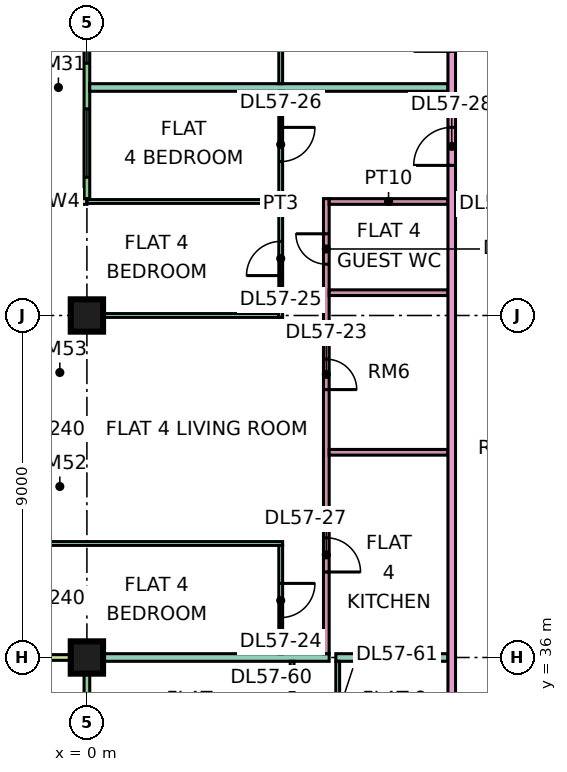
"""IFC4 building model, lengths in metres.
Left out: names, types, materials, properties, quantities, classifications, styles, units other than length and angle.
Written with IfcOpenShell. Run it as: python <this file> out.ifc"""

import sys

from ifc_helpers import new_model, si_unit, direction, frame, frame_2d, origin, origin_2d, place, context, subcontext, project, spatial, rectangle, extrude, element, fill, save


model = new_model("IFC4")
c1 = context("Model", 3, precision=1e-05, world=origin(), true_north=direction((0.0, 1.0)))
c2 = subcontext(c1, "Body", "Model", "MODEL_VIEW")
j1 = project(units=[si_unit("LENGTHUNIT", "METRE"), si_unit("PLANEANGLEUNIT", "RADIAN")], contexts=[c1])
p1 = place(None, origin())
s1 = spatial("IfcSite", under=j1, at=p1, CompositionType="ELEMENT")
p2 = place(p1, origin())
s2 = spatial("IfcBuilding", under=s1, at=p2, CompositionType="ELEMENT")
p3 = place(p2, frame((0.0, 0.0, 241.65)))
s3 = spatial("IfcBuildingStorey", under=s2, at=p3, CompositionType="ELEMENT", Elevation=241.65)
p4 = place(p3, frame((0.0, 36.0, 0.0), z_axis=(0.0, 0.0, 1.0), x_axis=(1.0, 0.0, 0.0)))
e1 = element("IfcColumn", 1, at=p4, inside=s3, PredefinedType="COLUMN", context=c2, shape_type="SweptSolid", body=[
    extrude(rectangle(XDim=0.85, YDim=0.85, at=origin_2d()), origin(), (0.0, 0.0, 1.0), 3.75),
])
p5 = place(p3, frame((0.0, 45.0, 0.0), z_axis=(0.0, 0.0, 1.0), x_axis=(1.0, 0.0, 0.0)))
e2 = element("IfcColumn", 2, at=p5, inside=s3, PredefinedType="COLUMN", context=c2, shape_type="SweptSolid", body=[
    extrude(rectangle(XDim=0.85, YDim=0.85, at=origin_2d()), origin(), (0.0, 0.0, 1.0), 3.75),
])
p6 = place(p3, frame((0.0, 61.425, 0.0), z_axis=(0.0, 0.0, 1.0), x_axis=(0.0, -1.0, 0.0)))
e3 = element("IfcWall", 3, at=p6, inside=s3, PredefinedType="SOLIDWALL", context=c2, shape_type="SweptSolid", body=[
    extrude(rectangle(XDim=13.35, YDim=0.15, at=frame_2d((6.675, 0.0))), origin(), (0.0, 0.0, 1.0), 3.35),
])
p7 = place(p6, frame((1.312, 0.0, 0.0)))
e4 = element("IfcOpeningElement", 4, at=p7, cuts=e3, PredefinedType="OPENING", context=c2, shape_type="SweptSolid", body=[
    extrude(rectangle(XDim=1.8, YDim=2.4, at=frame_2d((0.9, 1.2))), frame((0.0, 0.085, 0.0), z_axis=(0.0, -1.0, 0.0), x_axis=(1.0, 0.0, 0.0)), (0.0, 0.0, 1.0), 0.17),
])
p8 = place(p6, frame((5.062, 0.0, 0.45)))
e5 = element("IfcOpeningElement", 5, at=p8, cuts=e3, PredefinedType="OPENING", context=c2, shape_type="SweptSolid", body=[
    extrude(rectangle(XDim=1.2, YDim=2.4, at=frame_2d((0.6, 1.2))), frame((0.0, 0.085, 0.0), z_axis=(0.0, -1.0, 0.0), x_axis=(1.0, 0.0, 0.0)), (0.0, 0.0, 1.0), 0.17),
])
p9 = place(p6, frame((8.587, 0.0, 0.45)))
e6 = element("IfcOpeningElement", 6, at=p9, cuts=e3, PredefinedType="OPENING", context=c2, shape_type="SweptSolid", body=[
    extrude(rectangle(XDim=1.2, YDim=2.4, at=frame_2d((0.6, 1.2))), frame((0.0, 0.085, 0.0), z_axis=(0.0, -1.0, 0.0), x_axis=(1.0, 0.0, 0.0)), (0.0, 0.0, 1.0), 0.17),
])
p10 = place(p6, frame((10.988, 0.0, 0.45)))
e7 = element("IfcOpeningElement", 7, at=p10, cuts=e3, PredefinedType="OPENING", context=c2, shape_type="SweptSolid", body=[
    extrude(rectangle(XDim=1.8, YDim=2.4, at=frame_2d((0.9, 1.2))), frame((0.0, 0.085, 0.0), z_axis=(0.0, -1.0, 0.0), x_axis=(1.0, 0.0, 0.0)), (0.0, 0.0, 1.0), 0.17),
])
p11 = place(p3, frame((-1.5, 48.0, 0.0), z_axis=(0.0, 0.0, 1.0), x_axis=(1.0, 0.0, 0.0)))
e8 = element("IfcWall", 8, at=p11, inside=s3, PredefinedType="SOLIDWALL", context=c2, shape_type="SweptSolid", body=[
    extrude(rectangle(XDim=1.5, YDim=0.15, at=frame_2d((0.75, 0.0))), origin(), (0.0, 0.0, 1.0), 3.35),
])
p12 = place(p3, frame((0.0, 35.925, 0.0), z_axis=(0.0, 0.0, 1.0), x_axis=(0.0, -1.0, 0.0)))
e9 = element("IfcWall", 9, at=p12, inside=s3, PredefinedType="SOLIDWALL", context=c2, shape_type="SweptSolid", body=[
    extrude(rectangle(XDim=11.85, YDim=0.15, at=frame_2d((5.925, 0.0))), origin(), (0.0, 0.0, 1.0), 3.35),
])
p13 = place(p12, frame((1.087, 0.0, 0.0)))
e10 = element("IfcOpeningElement", 10, at=p13, cuts=e9, PredefinedType="OPENING", context=c2, shape_type="SweptSolid", body=[
    extrude(rectangle(XDim=1.2, YDim=2.4, at=frame_2d((0.6, 1.2))), frame((0.0, 0.085, 0.0), z_axis=(0.0, -1.0, 0.0), x_axis=(1.0, 0.0, 0.0)), (0.0, 0.0, 1.0), 0.17),
])
p14 = place(p12, frame((3.525, 0.0, 0.45)))
e11 = element("IfcOpeningElement", 11, at=p14, cuts=e9, PredefinedType="OPENING", context=c2, shape_type="SweptSolid", body=[
    extrude(rectangle(XDim=1.8, YDim=2.4, at=frame_2d((0.9, 1.2))), frame((0.0, 0.085, 0.0), z_axis=(0.0, -1.0, 0.0), x_axis=(1.0, 0.0, 0.0)), (0.0, 0.0, 1.0), 0.17),
])
p15 = place(p12, frame((7.163, 0.0, 0.45)))
e12 = element("IfcOpeningElement", 12, at=p15, cuts=e9, PredefinedType="OPENING", context=c2, shape_type="SweptSolid", body=[
    extrude(rectangle(XDim=3.0, YDim=2.4, at=frame_2d((1.5, 1.2))), frame((0.0, 0.085, 0.0), z_axis=(0.0, -1.0, 0.0), x_axis=(1.0, 0.0, 0.0)), (0.0, 0.0, 1.0), 0.17),
])
p16 = place(p3, frame((-1.5, 36.0, 0.0), z_axis=(0.0, 0.0, 1.0), x_axis=(1.0, 0.0, 0.0)))
e13 = element("IfcWall", 13, at=p16, inside=s3, PredefinedType="SOLIDWALL", context=c2, shape_type="SweptSolid", body=[
    extrude(rectangle(XDim=1.5, YDim=0.15, at=frame_2d((0.75, 0.0))), origin(), (0.0, 0.0, 1.0), 3.35),
])
e14 = element("IfcWall", 14, at=p4, inside=s3, PredefinedType="PARTITIONING", context=c2, shape_type="SweptSolid", body=[
    extrude(rectangle(XDim=6.375, YDim=0.2, at=frame_2d((3.188, 0.0))), origin(), (0.0, 0.0, 1.0), 3.35),
])
p17 = place(p3, frame((-1.35, 39.0, 0.0), z_axis=(0.0, 0.0, 1.0), x_axis=(1.0, 0.0, 0.0)))
e15 = element("IfcWall", 15, at=p17, inside=s3, PredefinedType="PARTITIONING", context=c2, shape_type="SweptSolid", body=[
    extrude(rectangle(XDim=6.5, YDim=0.1, at=frame_2d((3.25, 0.0))), origin(), (0.0, 0.0, 1.0), 3.35),
])
e16 = element("IfcWall", 16, at=p5, inside=s3, PredefinedType="PARTITIONING", context=c2, shape_type="SweptSolid", body=[
    extrude(rectangle(XDim=5.05, YDim=0.1, at=frame_2d((2.525, 0.0))), origin(), (0.0, 0.0, 1.0), 3.35),
])
p18 = place(p3, frame((0.0, 48.0, 0.0), z_axis=(0.0, 0.0, 1.0), x_axis=(1.0, 0.0, 0.0)))
e17 = element("IfcWall", 17, at=p18, inside=s3, PredefinedType="PARTITIONING", context=c2, shape_type="SweptSolid", body=[
    extrude(rectangle(XDim=5.05, YDim=0.1, at=frame_2d((2.525, 0.0))), origin(), (0.0, 0.0, 1.0), 3.35),
])
p19 = place(p3, frame((0.074, 51.0, 0.0), z_axis=(0.0, 0.0, 1.0), x_axis=(1.0, 0.0, 0.0)))
e18 = element("IfcWall", 18, at=p19, inside=s3, PredefinedType="PARTITIONING", context=c2, shape_type="SweptSolid", body=[
    extrude(rectangle(XDim=9.426, YDim=0.2, at=frame_2d((4.713, 0.0))), origin(), (0.0, 0.0, 1.0), 3.35),
])
p20 = place(p3, frame((5.1, 36.1, 0.0), z_axis=(0.0, 0.0, 1.0), x_axis=(0.0, 1.0, 0.0)))
e19 = element("IfcWall", 19, at=p20, inside=s3, PredefinedType="PARTITIONING", context=c2, shape_type="SweptSolid", body=[
    extrude(rectangle(XDim=2.85, YDim=0.1, at=frame_2d((1.425, 0.0))), origin(), (0.0, 0.0, 1.0), 3.35),
])
p21 = place(p20, frame((0.95, 0.0, 0.0)))
e20 = element("IfcOpeningElement", 20, at=p21, cuts=e19, PredefinedType="OPENING", context=c2, shape_type="SweptSolid", body=[
    extrude(rectangle(XDim=0.9, YDim=2.1, at=frame_2d((0.45, 1.05))), frame((0.0, 0.06, 0.0), z_axis=(0.0, -1.0, 0.0), x_axis=(1.0, 0.0, 0.0)), (0.0, 0.0, 1.0), 0.12),
])
p22 = place(p3, frame((5.1, 44.95, 0.0), z_axis=(0.0, 0.0, 1.0), x_axis=(0.0, 1.0, 0.0)))
e21 = element("IfcWall", 21, at=p22, inside=s3, PredefinedType="PARTITIONING", context=c2, shape_type="SweptSolid", body=[
    extrude(rectangle(XDim=5.95, YDim=0.1, at=frame_2d((2.975, 0.0))), origin(), (0.0, 0.0, 1.0), 3.35),
])
p23 = place(p22, frame((1.1, 0.0, 0.0)))
e22 = element("IfcOpeningElement", 22, at=p23, cuts=e21, PredefinedType="OPENING", context=c2, shape_type="SweptSolid", body=[
    extrude(rectangle(XDim=0.9, YDim=2.1, at=frame_2d((0.45, 1.05))), frame((0.0, 0.06, 0.0), z_axis=(0.0, -1.0, 0.0), x_axis=(1.0, 0.0, 0.0)), (0.0, 0.0, 1.0), 0.12),
])
p24 = place(p22, frame((4.1, 0.0, 0.0)))
e23 = element("IfcOpeningElement", 23, at=p24, cuts=e21, PredefinedType="OPENING", context=c2, shape_type="SweptSolid", body=[
    extrude(rectangle(XDim=0.9, YDim=2.1, at=frame_2d((0.45, 1.05))), frame((0.0, 0.06, 0.0), z_axis=(0.0, -1.0, 0.0), x_axis=(1.0, 0.0, 0.0)), (0.0, 0.0, 1.0), 0.12),
])
p25 = place(p3, frame((5.1, 51.1, 0.0), z_axis=(0.0, 0.0, 1.0), x_axis=(0.0, 1.0, 0.0)))
e24 = element("IfcWall", 24, at=p25, inside=s3, PredefinedType="PARTITIONING", context=c2, shape_type="SweptSolid", body=[
    extrude(rectangle(XDim=5.95, YDim=0.1, at=frame_2d((2.975, 0.0))), origin(), (0.0, 0.0, 1.0), 3.35),
])
p26 = place(p25, frame((0.95, 0.0, 0.0)))
e25 = element("IfcOpeningElement", 25, at=p26, cuts=e24, PredefinedType="OPENING", context=c2, shape_type="SweptSolid", body=[
    extrude(rectangle(XDim=0.9, YDim=2.1, at=frame_2d((0.45, 1.05))), frame((0.0, 0.06, 0.0), z_axis=(0.0, -1.0, 0.0), x_axis=(1.0, 0.0, 0.0)), (0.0, 0.0, 1.0), 0.12),
])
p27 = place(p25, frame((3.95, 0.0, 0.0)))
e26 = element("IfcOpeningElement", 26, at=p27, cuts=e24, PredefinedType="OPENING", context=c2, shape_type="SweptSolid", body=[
    extrude(rectangle(XDim=0.9, YDim=2.1, at=frame_2d((0.45, 1.05))), frame((0.0, 0.06, 0.0), z_axis=(0.0, -1.0, 0.0), x_axis=(1.0, 0.0, 0.0)), (0.0, 0.0, 1.0), 0.12),
])
p28 = place(p3, frame((5.4, 29.95, 0.0), z_axis=(0.0, 0.0, 1.0), x_axis=(0.0, 1.0, 0.0)))
e27 = element("IfcWall", 27, at=p28, inside=s3, PredefinedType="PARTITIONING", context=c2, shape_type="SweptSolid", body=[
    extrude(rectangle(XDim=5.95, YDim=0.1, at=frame_2d((2.975, 0.0))), origin(), (0.0, 0.0, 1.0), 3.35),
])
p29 = place(p28, frame((1.1, 0.0, 0.0)))
e28 = element("IfcOpeningElement", 28, at=p29, cuts=e27, PredefinedType="OPENING", context=c2, shape_type="SweptSolid", body=[
    extrude(rectangle(XDim=0.9, YDim=2.1, at=frame_2d((0.45, 1.05))), frame((0.0, 0.06, 0.0), z_axis=(0.0, -1.0, 0.0), x_axis=(1.0, 0.0, 0.0)), (0.0, 0.0, 1.0), 0.12),
])
p30 = place(p28, frame((4.1, 0.0, 0.0)))
e29 = element("IfcOpeningElement", 29, at=p30, cuts=e27, PredefinedType="OPENING", context=c2, shape_type="SweptSolid", body=[
    extrude(rectangle(XDim=0.9, YDim=2.1, at=frame_2d((0.45, 1.05))), frame((0.0, 0.06, 0.0), z_axis=(0.0, -1.0, 0.0), x_axis=(1.0, 0.0, 0.0)), (0.0, 0.0, 1.0), 0.12),
])
p31 = place(p3, frame((6.3, 36.1, 0.0), z_axis=(0.0, 0.0, 1.0), x_axis=(0.0, 1.0, 0.0)))
e30 = element("IfcWall", 30, at=p31, inside=s3, PredefinedType="PARTITIONING", context=c2, shape_type="SweptSolid", body=[
    extrude(rectangle(XDim=11.975, YDim=0.15, at=frame_2d((5.987, 0.0))), origin(), (0.0, 0.0, 1.0), 3.35),
])
p32 = place(p31, frame((6.95, 0.0, 0.0)))
e31 = element("IfcOpeningElement", 31, at=p32, cuts=e30, PredefinedType="OPENING", context=c2, shape_type="SweptSolid", body=[
    extrude(rectangle(XDim=0.8, YDim=2.1, at=frame_2d((0.4, 1.05))), frame((0.0, 0.085, 0.0), z_axis=(0.0, -1.0, 0.0), x_axis=(1.0, 0.0, 0.0)), (0.0, 0.0, 1.0), 0.17),
])
p33 = place(p31, frame((2.15, 0.0, 0.0)))
e32 = element("IfcOpeningElement", 32, at=p33, cuts=e30, PredefinedType="OPENING", context=c2, shape_type="SweptSolid", body=[
    extrude(rectangle(XDim=0.9, YDim=2.1, at=frame_2d((0.45, 1.05))), frame((0.0, 0.085, 0.0), z_axis=(0.0, -1.0, 0.0), x_axis=(1.0, 0.0, 0.0)), (0.0, 0.0, 1.0), 0.17),
])
p34 = place(p31, frame((10.25, 0.0, 0.0)))
e33 = element("IfcOpeningElement", 33, at=p34, cuts=e30, PredefinedType="OPENING", context=c2, shape_type="SweptSolid", body=[
    extrude(rectangle(XDim=0.8, YDim=2.1, at=frame_2d((0.4, 1.05))), frame((0.0, 0.085, 0.0), z_axis=(0.0, -1.0, 0.0), x_axis=(1.0, 0.0, 0.0)), (0.0, 0.0, 1.0), 0.17),
])
for number, where, z_axis, x_axis in (
    (34, (6.375, 41.4, 0.0), (0.0, 0.0, 1.0), (1.0, 0.0, 0.0)),
    (35, (6.375, 45.6, 0.0), (0.0, 0.0, 1.0), (1.0, 0.0, 0.0)),
    (36, (6.375, 48.0, 0.0), (0.0, 0.0, 1.0), (1.0, 0.0, 0.0)),
):
    element("IfcWall", number, at=place(p3, frame(where, z_axis=z_axis, x_axis=x_axis)), inside=s3, PredefinedType="PARTITIONING", context=c2, shape_type="SweptSolid", body=[
        extrude(rectangle(XDim=3.125, YDim=0.15, at=frame_2d((1.562, 0.0))), origin(), (0.0, 0.0, 1.0), 3.35),
    ])
p35 = place(p3, frame((6.55, 36.0, 0.0), z_axis=(0.0, 0.0, 1.0), x_axis=(1.0, 0.0, 0.0)))
e37 = element("IfcWall", 37, at=p35, inside=s3, PredefinedType="PARTITIONING", context=c2, shape_type="SweptSolid", body=[
    extrude(rectangle(XDim=2.95, YDim=0.2, at=frame_2d((1.475, 0.0))), origin(), (0.0, 0.0, 1.0), 3.35),
])
p36 = place(p3, frame((6.6, 32.95, 0.0), z_axis=(0.0, 0.0, 1.0), x_axis=(0.0, 1.0, 0.0)))
e38 = element("IfcWall", 38, at=p36, inside=s3, PredefinedType="PARTITIONING", context=c2, shape_type="SweptSolid", body=[
    extrude(rectangle(XDim=2.95, YDim=0.1, at=frame_2d((1.475, 0.0))), origin(), (0.0, 0.0, 1.0), 3.35),
])
p37 = place(p36, frame((1.1, 0.0, 0.0)))
e39 = element("IfcOpeningElement", 39, at=p37, cuts=e38, PredefinedType="OPENING", context=c2, shape_type="SweptSolid", body=[
    extrude(rectangle(XDim=0.9, YDim=2.1, at=frame_2d((0.45, 1.05))), frame((0.0, 0.06, 0.0), z_axis=(0.0, -1.0, 0.0), x_axis=(1.0, 0.0, 0.0)), (0.0, 0.0, 1.0), 0.12),
])
p38 = place(p3, frame((9.6, 20.0, 0.0), z_axis=(0.0, 0.0, 1.0), x_axis=(0.0, 1.0, 0.0)))
e40 = element("IfcWall", 40, at=p38, inside=s3, PredefinedType="PARTITIONING", context=c2, shape_type="SweptSolid", body=[
    extrude(rectangle(XDim=42.926, YDim=0.2, at=frame_2d((21.463, 0.0))), origin(), (0.0, 0.0, 1.0), 3.35),
])
p39 = place(p38, frame((28.95, 0.0, 0.0)))
e41 = element("IfcOpeningElement", 41, at=p39, cuts=e40, PredefinedType="OPENING", context=c2, shape_type="SweptSolid", body=[
    extrude(rectangle(XDim=1.0, YDim=2.1, at=frame_2d((0.5, 1.05))), frame((0.0, 0.11, 0.0), z_axis=(0.0, -1.0, 0.0), x_axis=(1.0, 0.0, 0.0)), (0.0, 0.0, 1.0), 0.22),
])
p40 = place(p38, frame((31.95, 0.0, 0.0)))
e42 = element("IfcOpeningElement", 42, at=p40, cuts=e40, PredefinedType="OPENING", context=c2, shape_type="SweptSolid", body=[
    extrude(rectangle(XDim=1.0, YDim=2.1, at=frame_2d((0.5, 1.05))), frame((0.0, 0.11, 0.0), z_axis=(0.0, -1.0, 0.0), x_axis=(1.0, 0.0, 0.0)), (0.0, 0.0, 1.0), 0.22),
])
p41 = place(p38, frame((0.6, 0.0, 0.0)))
e43 = element("IfcOpeningElement", 43, at=p41, cuts=e40, PredefinedType="OPENING", context=c2, shape_type="SweptSolid", body=[
    extrude(rectangle(XDim=1.2, YDim=2.1, at=frame_2d((0.6, 1.05))), frame((0.0, 0.11, 0.0), z_axis=(0.0, -1.0, 0.0), x_axis=(1.0, 0.0, 0.0)), (0.0, 0.0, 1.0), 0.22),
])
p42 = place(p38, frame((11.25, 0.0, 0.0)))
e44 = element("IfcOpeningElement", 44, at=p42, cuts=e40, PredefinedType="OPENING", context=c2, shape_type="SweptSolid", body=[
    extrude(rectangle(XDim=1.0, YDim=2.1, at=frame_2d((0.5, 1.05))), frame((0.0, 0.11, 0.0), z_axis=(0.0, -1.0, 0.0), x_axis=(1.0, 0.0, 0.0)), (0.0, 0.0, 1.0), 0.22),
])
p43 = place(p9, origin())
e45 = element("IfcWindow", 45, at=p43, inside=s3, PartitioningType="SINGLE_PANEL", PredefinedType="WINDOW", context=c2, shape_type="SweptSolid", body=[
    extrude(rectangle(XDim=1.2, YDim=2.4, at=frame_2d((0.6, 1.2))), frame((0.0, 0.03, 0.0), z_axis=(0.0, -1.0, 0.0), x_axis=(1.0, 0.0, 0.0)), (0.0, 0.0, 1.0), 0.06),
])
fill(e6, e45)
p44 = place(p10, origin())
e46 = element("IfcWindow", 46, at=p44, inside=s3, PartitioningType="SINGLE_PANEL", PredefinedType="WINDOW", context=c2, shape_type="SweptSolid", body=[
    extrude(rectangle(XDim=1.8, YDim=2.4, at=frame_2d((0.9, 1.2))), frame((0.0, 0.03, 0.0), z_axis=(0.0, -1.0, 0.0), x_axis=(1.0, 0.0, 0.0)), (0.0, 0.0, 1.0), 0.06),
])
fill(e7, e46)
p45 = place(p32, frame((0.8, 0.0, 0.0), z_axis=(0.0, 0.0, 1.0), x_axis=(-1.0, 0.0, 0.0)))
e47 = element("IfcDoor", 47, at=p45, inside=s3, OperationType="SINGLE_SWING_LEFT", PredefinedType="DOOR", context=c2, shape_type="SweptSolid", body=[
    extrude(rectangle(XDim=0.8, YDim=2.1, at=frame_2d((0.4, 1.05))), frame((0.0, 0.025, 0.0), z_axis=(0.0, -1.0, 0.0), x_axis=(1.0, 0.0, 0.0)), (0.0, 0.0, 1.0), 0.05),
])
fill(e31, e47)
p46 = place(p21, origin())
e48 = element("IfcDoor", 48, at=p46, inside=s3, OperationType="SINGLE_SWING_RIGHT", PredefinedType="DOOR", context=c2, shape_type="SweptSolid", body=[
    extrude(rectangle(XDim=0.9, YDim=2.1, at=frame_2d((0.45, 1.05))), frame((0.0, 0.025, 0.0), z_axis=(0.0, -1.0, 0.0), x_axis=(1.0, 0.0, 0.0)), (0.0, 0.0, 1.0), 0.05),
])
fill(e20, e48)
p47 = place(p23, origin())
e49 = element("IfcDoor", 49, at=p47, inside=s3, OperationType="SINGLE_SWING_LEFT", PredefinedType="DOOR", context=c2, shape_type="SweptSolid", body=[
    extrude(rectangle(XDim=0.9, YDim=2.1, at=frame_2d((0.45, 1.05))), frame((0.0, 0.025, 0.0), z_axis=(0.0, -1.0, 0.0), x_axis=(1.0, 0.0, 0.0)), (0.0, 0.0, 1.0), 0.05),
])
fill(e22, e49)
p48 = place(p24, origin())
e50 = element("IfcDoor", 50, at=p48, inside=s3, OperationType="SINGLE_SWING_RIGHT", PredefinedType="DOOR", context=c2, shape_type="SweptSolid", body=[
    extrude(rectangle(XDim=0.9, YDim=2.1, at=frame_2d((0.45, 1.05))), frame((0.0, 0.025, 0.0), z_axis=(0.0, -1.0, 0.0), x_axis=(1.0, 0.0, 0.0)), (0.0, 0.0, 1.0), 0.05),
])
fill(e23, e50)
p49 = place(p33, frame((0.9, 0.0, 0.0), z_axis=(0.0, 0.0, 1.0), x_axis=(-1.0, 0.0, 0.0)))
e51 = element("IfcDoor", 51, at=p49, inside=s3, OperationType="SINGLE_SWING_LEFT", PredefinedType="DOOR", context=c2, shape_type="SweptSolid", body=[
    extrude(rectangle(XDim=0.9, YDim=2.1, at=frame_2d((0.45, 1.05))), frame((0.0, 0.025, 0.0), z_axis=(0.0, -1.0, 0.0), x_axis=(1.0, 0.0, 0.0)), (0.0, 0.0, 1.0), 0.05),
])
fill(e32, e51)
p50 = place(p39, origin())
e52 = element("IfcDoor", 52, at=p50, inside=s3, OperationType="SINGLE_SWING_LEFT", PredefinedType="DOOR", context=c2, shape_type="SweptSolid", body=[
    extrude(rectangle(XDim=1.0, YDim=2.1, at=frame_2d((0.5, 1.05))), frame((0.0, 0.025, 0.0), z_axis=(0.0, -1.0, 0.0), x_axis=(1.0, 0.0, 0.0)), (0.0, 0.0, 1.0), 0.05),
])
fill(e41, e52)
p51 = place(p34, frame((0.8, 0.0, 0.0), z_axis=(0.0, 0.0, 1.0), x_axis=(-1.0, 0.0, 0.0)))
e53 = element("IfcDoor", 53, at=p51, inside=s3, OperationType="SINGLE_SWING_RIGHT", PredefinedType="DOOR", context=c2, shape_type="SweptSolid", body=[
    extrude(rectangle(XDim=0.8, YDim=2.1, at=frame_2d((0.4, 1.05))), frame((0.0, 0.025, 0.0), z_axis=(0.0, -1.0, 0.0), x_axis=(1.0, 0.0, 0.0)), (0.0, 0.0, 1.0), 0.05),
])
fill(e33, e53)
save(model, sys.argv[1])
